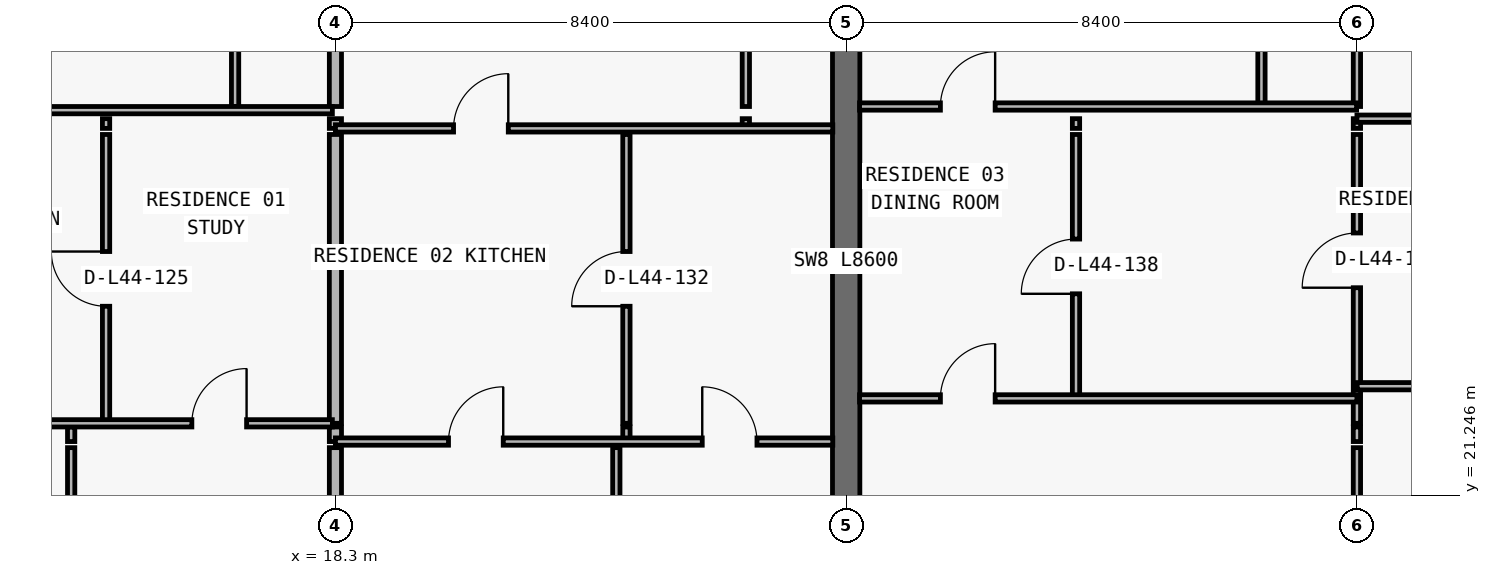
"""IFC4 building model, lengths in metres.
Left out: names, types, materials, properties, quantities, classifications, styles, units other than length and angle.
Written with IfcOpenShell. Run it as: python <this file> out.ifc"""

import sys

from ifc_helpers import new_model, si_unit, direction, frame, frame_2d, origin, place, context, subcontext, project, spatial, rectangle, extrude, element, fill, save


model = new_model("IFC4")
c1 = context("Model", 3, precision=1e-05, world=origin(), true_north=direction((0.0, 1.0)))
c2 = subcontext(c1, "Body", "Model", "MODEL_VIEW")
j1 = project(units=[si_unit("LENGTHUNIT", "METRE"), si_unit("PLANEANGLEUNIT", "RADIAN")], contexts=[c1])
p1 = place(None, origin())
s1 = spatial("IfcSite", under=j1, at=p1, CompositionType="ELEMENT")
p2 = place(p1, origin())
s2 = spatial("IfcBuilding", under=s1, at=p2, CompositionType="ELEMENT")
p3 = place(p2, frame((0.0, 0.0, 160.5)))
s3 = spatial("IfcBuildingStorey", under=s2, at=p3, CompositionType="ELEMENT", Elevation=160.5)
p4 = place(p3, frame((26.7, 20.8, 0.0), z_axis=(0.0, 0.0, 1.0), x_axis=(0.0, 1.0, 0.0)))
e1 = element("IfcWall", 1, at=p4, inside=s3, PredefinedType="SHEAR", context=c2, shape_type="SweptSolid", body=[
    extrude(rectangle(XDim=8.6, YDim=0.45, at=frame_2d((4.3, 0.0))), origin(), (0.0, 0.0, 1.0), 3.05),
])
p5 = place(p3, frame((13.954, 11.24, 0.0), z_axis=(0.0, 0.0, 1.0), x_axis=(0.0, 1.0, 0.0)))
e2 = element("IfcWall", 2, at=p5, inside=s3, PredefinedType="PARTITIONING", context=c2, shape_type="SweptSolid", body=[
    extrude(rectangle(XDim=10.79, YDim=0.12, at=frame_2d((5.395, 0.0))), origin(), (0.0, 0.0, 1.0), 3.05),
])
p6 = place(p3, frame((13.954, 22.13, 0.0), z_axis=(0.0, 0.0, 1.0), x_axis=(0.0, 1.0, 0.0)))
e3 = element("IfcWall", 3, at=p6, inside=s3, PredefinedType="PARTITIONING", context=c2, shape_type="SweptSolid", body=[
    extrude(rectangle(XDim=0.24, YDim=0.12, at=frame_2d((0.12, 0.0))), origin(), (0.0, 0.0, 1.0), 3.05),
])
p7 = place(p3, frame((14.528, 22.43, 0.0), z_axis=(0.0, 0.0, 1.0), x_axis=(0.0, 1.0, 0.0)))
e4 = element("IfcWall", 4, at=p7, inside=s3, PredefinedType="PARTITIONING", context=c2, shape_type="SweptSolid", body=[
    extrude(rectangle(XDim=4.75, YDim=0.12, at=frame_2d((2.375, 0.0))), origin(), (0.0, 0.0, 1.0), 3.05),
])
p8 = place(p7, frame((1.925, 0.0, 0.0)))
e5 = element("IfcOpeningElement", 5, at=p8, cuts=e4, PredefinedType="OPENING", context=c2, shape_type="SweptSolid", body=[
    extrude(rectangle(XDim=0.9, YDim=2.15, at=frame_2d((0.45, 1.075))), frame((0.0, 0.07, 0.0), z_axis=(0.0, -1.0, 0.0), x_axis=(1.0, 0.0, 0.0)), (0.0, 0.0, 1.0), 0.14),
])
p9 = place(p3, frame((14.528, 27.28, 0.0), z_axis=(0.0, 0.0, 1.0), x_axis=(0.0, 1.0, 0.0)))
e6 = element("IfcWall", 6, at=p9, inside=s3, PredefinedType="PARTITIONING", context=c2, shape_type="SweptSolid", body=[
    extrude(rectangle(XDim=0.16, YDim=0.12, at=frame_2d((0.08, 0.0))), origin(), (0.0, 0.0, 1.0), 3.05),
])
p10 = place(p3, frame((16.65, 27.64, 0.0), z_axis=(0.0, 0.0, 1.0), x_axis=(0.0, 1.0, 0.0)))
e7 = element("IfcWall", 7, at=p10, inside=s3, PredefinedType="PARTITIONING", context=c2, shape_type="SweptSolid", body=[
    extrude(rectangle(XDim=6.56, YDim=0.12, at=frame_2d((3.28, 0.0))), origin(), (0.0, 0.0, 1.0), 3.05),
])
p11 = place(p10, frame((2.855, 0.0, 0.0)))
e8 = element("IfcOpeningElement", 8, at=p11, cuts=e7, PredefinedType="OPENING", context=c2, shape_type="SweptSolid", body=[
    extrude(rectangle(XDim=0.85, YDim=2.1, at=frame_2d((0.425, 1.05))), frame((0.0, 0.07, 0.0), z_axis=(0.0, -1.0, 0.0), x_axis=(1.0, 0.0, 0.0)), (0.0, 0.0, 1.0), 0.14),
])
p12 = place(p3, frame((18.3, 11.24, 0.0), z_axis=(0.0, 0.0, 1.0), x_axis=(0.0, 1.0, 0.0)))
e9 = element("IfcWall", 9, at=p12, inside=s3, PredefinedType="PARTITIONING", context=c2, shape_type="SweptSolid", body=[
    extrude(rectangle(XDim=10.79, YDim=0.2, at=frame_2d((5.395, 0.0))), origin(), (0.0, 0.0, 1.0), 2.263),
])
p13 = place(p3, frame((18.3, 22.13, 0.0), z_axis=(0.0, 0.0, 1.0), x_axis=(0.0, 1.0, 0.0)))
e10 = element("IfcWall", 10, at=p13, inside=s3, PredefinedType="PARTITIONING", context=c2, shape_type="SweptSolid", body=[
    extrude(rectangle(XDim=0.24, YDim=0.2, at=frame_2d((0.12, 0.0))), origin(), (0.0, 0.0, 1.0), 2.263),
])
p14 = place(p3, frame((18.3, 22.43, 0.0), z_axis=(0.0, 0.0, 1.0), x_axis=(0.0, 1.0, 0.0)))
e11 = element("IfcWall", 11, at=p14, inside=s3, PredefinedType="PARTITIONING", context=c2, shape_type="SweptSolid", body=[
    extrude(rectangle(XDim=4.75, YDim=0.2, at=frame_2d((2.375, 0.0))), origin(), (0.0, 0.0, 1.0), 2.263),
])
p15 = place(p3, frame((18.3, 27.28, 0.0), z_axis=(0.0, 0.0, 1.0), x_axis=(0.0, 1.0, 0.0)))
e12 = element("IfcWall", 12, at=p15, inside=s3, PredefinedType="PARTITIONING", context=c2, shape_type="SweptSolid", body=[
    extrude(rectangle(XDim=0.16, YDim=0.2, at=frame_2d((0.08, 0.0))), origin(), (0.0, 0.0, 1.0), 2.263),
])
p16 = place(p3, frame((18.3, 27.64, 0.0), z_axis=(0.0, 0.0, 1.0), x_axis=(0.0, 1.0, 0.0)))
e13 = element("IfcWall", 13, at=p16, inside=s3, PredefinedType="PARTITIONING", context=c2, shape_type="SweptSolid", body=[
    extrude(rectangle(XDim=6.56, YDim=0.2, at=frame_2d((3.28, 0.0))), origin(), (0.0, 0.0, 1.0), 2.263),
])
p17 = place(p3, frame((22.92, 11.24, 0.0), z_axis=(0.0, 0.0, 1.0), x_axis=(0.0, 1.0, 0.0)))
e14 = element("IfcWall", 14, at=p17, inside=s3, PredefinedType="PARTITIONING", context=c2, shape_type="SweptSolid", body=[
    extrude(rectangle(XDim=10.79, YDim=0.12, at=frame_2d((5.395, 0.0))), origin(), (0.0, 0.0, 1.0), 3.05),
])
p18 = place(p3, frame((23.086, 22.13, 0.0), z_axis=(0.0, 0.0, 1.0), x_axis=(0.0, 1.0, 0.0)))
e15 = element("IfcWall", 15, at=p18, inside=s3, PredefinedType="PARTITIONING", context=c2, shape_type="SweptSolid", body=[
    extrude(rectangle(XDim=0.24, YDim=0.12, at=frame_2d((0.12, 0.0))), origin(), (0.0, 0.0, 1.0), 3.05),
])
p19 = place(p3, frame((23.086, 22.43, 0.0), z_axis=(0.0, 0.0, 1.0), x_axis=(0.0, 1.0, 0.0)))
e16 = element("IfcWall", 16, at=p19, inside=s3, PredefinedType="PARTITIONING", context=c2, shape_type="SweptSolid", body=[
    extrude(rectangle(XDim=4.75, YDim=0.12, at=frame_2d((2.375, 0.0))), origin(), (0.0, 0.0, 1.0), 3.05),
])
p20 = place(p19, frame((1.925, 0.0, 0.0)))
e17 = element("IfcOpeningElement", 17, at=p20, cuts=e16, PredefinedType="OPENING", context=c2, shape_type="SweptSolid", body=[
    extrude(rectangle(XDim=0.9, YDim=2.15, at=frame_2d((0.45, 1.075))), frame((0.0, 0.07, 0.0), z_axis=(0.0, -1.0, 0.0), x_axis=(1.0, 0.0, 0.0)), (0.0, 0.0, 1.0), 0.14),
])
p21 = place(p3, frame((25.05, 27.28, 0.0), z_axis=(0.0, 0.0, 1.0), x_axis=(0.0, 1.0, 0.0)))
e18 = element("IfcWall", 18, at=p21, inside=s3, PredefinedType="PARTITIONING", context=c2, shape_type="SweptSolid", body=[
    extrude(rectangle(XDim=0.16, YDim=0.12, at=frame_2d((0.08, 0.0))), origin(), (0.0, 0.0, 1.0), 3.05),
])
p22 = place(p3, frame((25.05, 27.64, 0.0), z_axis=(0.0, 0.0, 1.0), x_axis=(0.0, 1.0, 0.0)))
e19 = element("IfcWall", 19, at=p22, inside=s3, PredefinedType="PARTITIONING", context=c2, shape_type="SweptSolid", body=[
    extrude(rectangle(XDim=6.56, YDim=0.12, at=frame_2d((3.28, 0.0))), origin(), (0.0, 0.0, 1.0), 3.05),
])
p23 = place(p22, frame((2.855, 0.0, 0.0)))
e20 = element("IfcOpeningElement", 20, at=p23, cuts=e19, PredefinedType="OPENING", context=c2, shape_type="SweptSolid", body=[
    extrude(rectangle(XDim=0.85, YDim=2.1, at=frame_2d((0.425, 1.05))), frame((0.0, 0.07, 0.0), z_axis=(0.0, -1.0, 0.0), x_axis=(1.0, 0.0, 0.0)), (0.0, 0.0, 1.0), 0.14),
])
p24 = place(p3, frame((30.48, 22.84, 0.0), z_axis=(0.0, 0.0, 1.0), x_axis=(0.0, 1.0, 0.0)))
e21 = element("IfcWall", 21, at=p24, inside=s3, PredefinedType="PARTITIONING", context=c2, shape_type="SweptSolid", body=[
    extrude(rectangle(XDim=4.34, YDim=0.12, at=frame_2d((2.17, 0.0))), origin(), (0.0, 0.0, 1.0), 3.05),
])
p25 = place(p24, frame((1.72, 0.0, 0.0)))
e22 = element("IfcOpeningElement", 22, at=p25, cuts=e21, PredefinedType="OPENING", context=c2, shape_type="SweptSolid", body=[
    extrude(rectangle(XDim=0.9, YDim=2.15, at=frame_2d((0.45, 1.075))), frame((0.0, 0.07, 0.0), z_axis=(0.0, -1.0, 0.0), x_axis=(1.0, 0.0, 0.0)), (0.0, 0.0, 1.0), 0.14),
])
p26 = place(p3, frame((30.48, 27.28, 0.0), z_axis=(0.0, 0.0, 1.0), x_axis=(0.0, 1.0, 0.0)))
e23 = element("IfcWall", 23, at=p26, inside=s3, PredefinedType="PARTITIONING", context=c2, shape_type="SweptSolid", body=[
    extrude(rectangle(XDim=0.16, YDim=0.12, at=frame_2d((0.08, 0.0))), origin(), (0.0, 0.0, 1.0), 3.05),
])
p27 = place(p3, frame((33.53, 27.64, 0.0), z_axis=(0.0, 0.0, 1.0), x_axis=(0.0, 1.0, 0.0)))
e24 = element("IfcWall", 24, at=p27, inside=s3, PredefinedType="PARTITIONING", context=c2, shape_type="SweptSolid", body=[
    extrude(rectangle(XDim=6.56, YDim=0.12, at=frame_2d((3.28, 0.0))), origin(), (0.0, 0.0, 1.0), 3.05),
])
p28 = place(p27, frame((2.855, 0.0, 0.0)))
e25 = element("IfcOpeningElement", 25, at=p28, cuts=e24, PredefinedType="OPENING", context=c2, shape_type="SweptSolid", body=[
    extrude(rectangle(XDim=0.85, YDim=2.1, at=frame_2d((0.425, 1.05))), frame((0.0, 0.07, 0.0), z_axis=(0.0, -1.0, 0.0), x_axis=(1.0, 0.0, 0.0)), (0.0, 0.0, 1.0), 0.14),
])
p29 = place(p3, frame((35.1, 11.24, 0.0), z_axis=(0.0, 0.0, 1.0), x_axis=(0.0, 1.0, 0.0)))
e26 = element("IfcWall", 26, at=p29, inside=s3, PredefinedType="PARTITIONING", context=c2, shape_type="SweptSolid", body=[
    extrude(rectangle(XDim=10.79, YDim=0.12, at=frame_2d((5.395, 0.0))), origin(), (0.0, 0.0, 1.0), 2.263),
])
p30 = place(p3, frame((35.1, 22.13, 0.0), z_axis=(0.0, 0.0, 1.0), x_axis=(0.0, 1.0, 0.0)))
e27 = element("IfcWall", 27, at=p30, inside=s3, PredefinedType="PARTITIONING", context=c2, shape_type="SweptSolid", body=[
    extrude(rectangle(XDim=0.24, YDim=0.12, at=frame_2d((0.12, 0.0))), origin(), (0.0, 0.0, 1.0), 2.263),
])
p31 = place(p3, frame((35.1, 22.43, 0.0), z_axis=(0.0, 0.0, 1.0), x_axis=(0.0, 1.0, 0.0)))
e28 = element("IfcWall", 28, at=p31, inside=s3, PredefinedType="PARTITIONING", context=c2, shape_type="SweptSolid", body=[
    extrude(rectangle(XDim=4.75, YDim=0.12, at=frame_2d((2.375, 0.0))), origin(), (0.0, 0.0, 1.0), 2.263),
])
p32 = place(p31, frame((2.23, 0.0, 0.0)))
e29 = element("IfcOpeningElement", 29, at=p32, cuts=e28, PredefinedType="OPENING", context=c2, shape_type="SweptSolid", body=[
    extrude(rectangle(XDim=0.9, YDim=2.15, at=frame_2d((0.45, 1.075))), frame((0.0, 0.07, 0.0), z_axis=(0.0, -1.0, 0.0), x_axis=(1.0, 0.0, 0.0)), (0.0, 0.0, 1.0), 0.14),
])
p33 = place(p3, frame((35.1, 27.28, 0.0), z_axis=(0.0, 0.0, 1.0), x_axis=(0.0, 1.0, 0.0)))
e30 = element("IfcWall", 30, at=p33, inside=s3, PredefinedType="PARTITIONING", context=c2, shape_type="SweptSolid", body=[
    extrude(rectangle(XDim=0.16, YDim=0.12, at=frame_2d((0.08, 0.0))), origin(), (0.0, 0.0, 1.0), 2.263),
])
p34 = place(p3, frame((35.1, 27.64, 0.0), z_axis=(0.0, 0.0, 1.0), x_axis=(0.0, 1.0, 0.0)))
e31 = element("IfcWall", 31, at=p34, inside=s3, PredefinedType="PARTITIONING", context=c2, shape_type="SweptSolid", body=[
    extrude(rectangle(XDim=6.56, YDim=0.12, at=frame_2d((3.28, 0.0))), origin(), (0.0, 0.0, 1.0), 2.263),
])
p35 = place(p3, frame((18.3, 22.13, 0.0), z_axis=(0.0, 0.0, 1.0), x_axis=(1.0, 0.0, 0.0)))
e32 = element("IfcWall", 32, at=p35, inside=s3, PredefinedType="PARTITIONING", context=c2, shape_type="SweptSolid", body=[
    extrude(rectangle(XDim=8.18, YDim=0.12, at=frame_2d((4.09, 0.0))), origin(), (0.0, 0.0, 1.0), 3.05),
])
p36 = place(p35, frame((1.86, 0.0, 0.0)))
e33 = element("IfcOpeningElement", 33, at=p36, cuts=e32, PredefinedType="OPENING", context=c2, shape_type="SweptSolid", body=[
    extrude(rectangle(XDim=0.9, YDim=2.15, at=frame_2d((0.45, 1.075))), frame((0.0, 0.07, 0.0), z_axis=(0.0, -1.0, 0.0), x_axis=(1.0, 0.0, 0.0)), (0.0, 0.0, 1.0), 0.14),
])
p37 = place(p35, frame((6.033, 0.0, 0.0)))
e34 = element("IfcOpeningElement", 34, at=p37, cuts=e32, PredefinedType="OPENING", context=c2, shape_type="SweptSolid", body=[
    extrude(rectangle(XDim=0.9, YDim=2.15, at=frame_2d((0.45, 1.075))), frame((0.0, 0.07, 0.0), z_axis=(0.0, -1.0, 0.0), x_axis=(1.0, 0.0, 0.0)), (0.0, 0.0, 1.0), 0.14),
])
p38 = place(p3, frame((10.1, 22.43, 0.0), z_axis=(0.0, 0.0, 1.0), x_axis=(1.0, 0.0, 0.0)))
e35 = element("IfcWall", 35, at=p38, inside=s3, PredefinedType="PARTITIONING", context=c2, shape_type="SweptSolid", body=[
    extrude(rectangle(XDim=8.15, YDim=0.12, at=frame_2d((4.075, 0.0))), origin(), (0.0, 0.0, 1.0), 3.05),
])
p39 = place(p38, frame((1.477, 0.0, 0.0)))
e36 = element("IfcOpeningElement", 36, at=p39, cuts=e35, PredefinedType="OPENING", context=c2, shape_type="SweptSolid", body=[
    extrude(rectangle(XDim=0.9, YDim=2.15, at=frame_2d((0.45, 1.075))), frame((0.0, 0.07, 0.0), z_axis=(0.0, -1.0, 0.0), x_axis=(1.0, 0.0, 0.0)), (0.0, 0.0, 1.0), 0.14),
])
p40 = place(p38, frame((5.839, 0.0, 0.0)))
e37 = element("IfcOpeningElement", 37, at=p40, cuts=e35, PredefinedType="OPENING", context=c2, shape_type="SweptSolid", body=[
    extrude(rectangle(XDim=0.9, YDim=2.15, at=frame_2d((0.45, 1.075))), frame((0.0, 0.07, 0.0), z_axis=(0.0, -1.0, 0.0), x_axis=(1.0, 0.0, 0.0)), (0.0, 0.0, 1.0), 0.14),
])
p41 = place(p3, frame((26.92, 22.84, 0.0), z_axis=(0.0, 0.0, 1.0), x_axis=(1.0, 0.0, 0.0)))
e38 = element("IfcWall", 38, at=p41, inside=s3, PredefinedType="PARTITIONING", context=c2, shape_type="SweptSolid", body=[
    extrude(rectangle(XDim=8.18, YDim=0.12, at=frame_2d((4.09, 0.0))), origin(), (0.0, 0.0, 1.0), 3.05),
])
p42 = place(p41, frame((1.33, 0.0, 0.0)))
e39 = element("IfcOpeningElement", 39, at=p42, cuts=e38, PredefinedType="OPENING", context=c2, shape_type="SweptSolid", body=[
    extrude(rectangle(XDim=0.9, YDim=2.15, at=frame_2d((0.45, 1.075))), frame((0.0, 0.07, 0.0), z_axis=(0.0, -1.0, 0.0), x_axis=(1.0, 0.0, 0.0)), (0.0, 0.0, 1.0), 0.14),
])
p43 = place(p3, frame((35.105, 23.04, 0.0), z_axis=(0.0, 0.0, 1.0), x_axis=(1.0, 0.0, 0.0)))
e40 = element("IfcWall", 40, at=p43, inside=s3, PredefinedType="PARTITIONING", context=c2, shape_type="SweptSolid", body=[
    extrude(rectangle(XDim=7.595, YDim=0.12, at=frame_2d((3.797, 0.0))), origin(), (0.0, 0.0, 1.0), 3.05),
])
p44 = place(p43, frame((3.347, 0.0, 0.0)))
e41 = element("IfcOpeningElement", 41, at=p44, cuts=e40, PredefinedType="OPENING", context=c2, shape_type="SweptSolid", body=[
    extrude(rectangle(XDim=0.9, YDim=2.15, at=frame_2d((0.45, 1.075))), frame((0.0, 0.07, 0.0), z_axis=(0.0, -1.0, 0.0), x_axis=(1.0, 0.0, 0.0)), (0.0, 0.0, 1.0), 0.14),
])
p45 = place(p3, frame((18.3, 27.28, 0.0), z_axis=(0.0, 0.0, 1.0), x_axis=(1.0, 0.0, 0.0)))
e42 = element("IfcWall", 42, at=p45, inside=s3, PredefinedType="PARTITIONING", context=c2, shape_type="SweptSolid", body=[
    extrude(rectangle(XDim=8.18, YDim=0.12, at=frame_2d((4.09, 0.0))), origin(), (0.0, 0.0, 1.0), 3.05),
])
p46 = place(p45, frame((1.943, 0.0, 0.0)))
e43 = element("IfcOpeningElement", 43, at=p46, cuts=e42, PredefinedType="OPENING", context=c2, shape_type="SweptSolid", body=[
    extrude(rectangle(XDim=0.9, YDim=2.15, at=frame_2d((0.45, 1.075))), frame((0.0, 0.07, 0.0), z_axis=(0.0, -1.0, 0.0), x_axis=(1.0, 0.0, 0.0)), (0.0, 0.0, 1.0), 0.14),
])
p47 = place(p3, frame((35.1, 27.44, 0.0), z_axis=(0.0, 0.0, 1.0), x_axis=(1.0, 0.0, 0.0)))
e44 = element("IfcWall", 44, at=p47, inside=s3, PredefinedType="PARTITIONING", context=c2, shape_type="SweptSolid", body=[
    extrude(rectangle(XDim=7.6, YDim=0.12, at=frame_2d((3.8, 0.0))), origin(), (0.0, 0.0, 1.0), 3.05),
])
p48 = place(p47, frame((2.6, 0.0, 0.0)))
e45 = element("IfcOpeningElement", 45, at=p48, cuts=e44, PredefinedType="OPENING", context=c2, shape_type="SweptSolid", body=[
    extrude(rectangle(XDim=0.9, YDim=2.15, at=frame_2d((0.45, 1.075))), frame((0.0, 0.07, 0.0), z_axis=(0.0, -1.0, 0.0), x_axis=(1.0, 0.0, 0.0)), (0.0, 0.0, 1.0), 0.14),
])
p49 = place(p3, frame((10.1, 27.58, 0.0), z_axis=(0.0, 0.0, 1.0), x_axis=(1.0, 0.0, 0.0)))
e46 = element("IfcWall", 46, at=p49, inside=s3, PredefinedType="PARTITIONING", context=c2, shape_type="SweptSolid", body=[
    extrude(rectangle(XDim=8.15, YDim=0.12, at=frame_2d((4.075, 0.0))), origin(), (0.0, 0.0, 1.0), 3.05),
])
p50 = place(p49, frame((1.764, 0.0, 0.0)))
e47 = element("IfcOpeningElement", 47, at=p50, cuts=e46, PredefinedType="OPENING", context=c2, shape_type="SweptSolid", body=[
    extrude(rectangle(XDim=0.9, YDim=2.15, at=frame_2d((0.45, 1.075))), frame((0.0, 0.07, 0.0), z_axis=(0.0, -1.0, 0.0), x_axis=(1.0, 0.0, 0.0)), (0.0, 0.0, 1.0), 0.14),
])
p51 = place(p3, frame((26.92, 27.64, 0.0), z_axis=(0.0, 0.0, 1.0), x_axis=(1.0, 0.0, 0.0)))
e48 = element("IfcWall", 48, at=p51, inside=s3, PredefinedType="PARTITIONING", context=c2, shape_type="SweptSolid", body=[
    extrude(rectangle(XDim=8.175, YDim=0.12, at=frame_2d((4.087, 0.0))), origin(), (0.0, 0.0, 1.0), 3.05),
])
p52 = place(p51, frame((1.33, 0.0, 0.0)))
e49 = element("IfcOpeningElement", 49, at=p52, cuts=e48, PredefinedType="OPENING", context=c2, shape_type="SweptSolid", body=[
    extrude(rectangle(XDim=0.9, YDim=2.15, at=frame_2d((0.45, 1.075))), frame((0.0, 0.07, 0.0), z_axis=(0.0, -1.0, 0.0), x_axis=(1.0, 0.0, 0.0)), (0.0, 0.0, 1.0), 0.14),
])
p53 = place(p8, origin())
e50 = element("IfcDoor", 50, at=p53, inside=s3, OperationType="SINGLE_SWING_RIGHT", PredefinedType="DOOR", context=c2, shape_type="SweptSolid", body=[
    extrude(rectangle(XDim=0.9, YDim=2.15, at=frame_2d((0.45, 1.075))), frame((0.0, 0.025, 0.0), z_axis=(0.0, -1.0, 0.0), x_axis=(1.0, 0.0, 0.0)), (0.0, 0.0, 1.0), 0.05),
])
fill(e5, e50)
p54 = place(p40, origin())
e51 = element("IfcDoor", 51, at=p54, inside=s3, OperationType="SINGLE_SWING_RIGHT", PredefinedType="DOOR", context=c2, shape_type="SweptSolid", body=[
    extrude(rectangle(XDim=0.9, YDim=2.15, at=frame_2d((0.45, 1.075))), frame((0.0, 0.025, 0.0), z_axis=(0.0, -1.0, 0.0), x_axis=(1.0, 0.0, 0.0)), (0.0, 0.0, 1.0), 0.05),
])
fill(e37, e51)
p55 = place(p46, origin())
e52 = element("IfcDoor", 52, at=p55, inside=s3, OperationType="SINGLE_SWING_RIGHT", PredefinedType="DOOR", context=c2, shape_type="SweptSolid", body=[
    extrude(rectangle(XDim=0.9, YDim=2.15, at=frame_2d((0.45, 1.075))), frame((0.0, 0.025, 0.0), z_axis=(0.0, -1.0, 0.0), x_axis=(1.0, 0.0, 0.0)), (0.0, 0.0, 1.0), 0.05),
])
fill(e43, e52)
p56 = place(p20, origin())
e53 = element("IfcDoor", 53, at=p56, inside=s3, OperationType="SINGLE_SWING_LEFT", PredefinedType="DOOR", context=c2, shape_type="SweptSolid", body=[
    extrude(rectangle(XDim=0.9, YDim=2.15, at=frame_2d((0.45, 1.075))), frame((0.0, 0.025, 0.0), z_axis=(0.0, -1.0, 0.0), x_axis=(1.0, 0.0, 0.0)), (0.0, 0.0, 1.0), 0.05),
])
fill(e17, e53)
p57 = place(p36, origin())
e54 = element("IfcDoor", 54, at=p57, inside=s3, OperationType="SINGLE_SWING_RIGHT", PredefinedType="DOOR", context=c2, shape_type="SweptSolid", body=[
    extrude(rectangle(XDim=0.9, YDim=2.15, at=frame_2d((0.45, 1.075))), frame((0.0, 0.025, 0.0), z_axis=(0.0, -1.0, 0.0), x_axis=(1.0, 0.0, 0.0)), (0.0, 0.0, 1.0), 0.05),
])
fill(e33, e54)
p58 = place(p37, origin())
e55 = element("IfcDoor", 55, at=p58, inside=s3, OperationType="SINGLE_SWING_LEFT", PredefinedType="DOOR", context=c2, shape_type="SweptSolid", body=[
    extrude(rectangle(XDim=0.9, YDim=2.15, at=frame_2d((0.45, 1.075))), frame((0.0, 0.025, 0.0), z_axis=(0.0, -1.0, 0.0), x_axis=(1.0, 0.0, 0.0)), (0.0, 0.0, 1.0), 0.05),
])
fill(e34, e55)
p59 = place(p52, origin())
e56 = element("IfcDoor", 56, at=p59, inside=s3, OperationType="SINGLE_SWING_RIGHT", PredefinedType="DOOR", context=c2, shape_type="SweptSolid", body=[
    extrude(rectangle(XDim=0.9, YDim=2.15, at=frame_2d((0.45, 1.075))), frame((0.0, 0.025, 0.0), z_axis=(0.0, -1.0, 0.0), x_axis=(1.0, 0.0, 0.0)), (0.0, 0.0, 1.0), 0.05),
])
fill(e49, e56)
p60 = place(p25, origin())
e57 = element("IfcDoor", 57, at=p60, inside=s3, OperationType="SINGLE_SWING_LEFT", PredefinedType="DOOR", context=c2, shape_type="SweptSolid", body=[
    extrude(rectangle(XDim=0.9, YDim=2.15, at=frame_2d((0.45, 1.075))), frame((0.0, 0.025, 0.0), z_axis=(0.0, -1.0, 0.0), x_axis=(1.0, 0.0, 0.0)), (0.0, 0.0, 1.0), 0.05),
])
fill(e22, e57)
p61 = place(p42, origin())
e58 = element("IfcDoor", 58, at=p61, inside=s3, OperationType="SINGLE_SWING_RIGHT", PredefinedType="DOOR", context=c2, shape_type="SweptSolid", body=[
    extrude(rectangle(XDim=0.9, YDim=2.15, at=frame_2d((0.45, 1.075))), frame((0.0, 0.025, 0.0), z_axis=(0.0, -1.0, 0.0), x_axis=(1.0, 0.0, 0.0)), (0.0, 0.0, 1.0), 0.05),
])
fill(e39, e58)
p62 = place(p32, origin())
e59 = element("IfcDoor", 59, at=p62, inside=s3, OperationType="SINGLE_SWING_LEFT", PredefinedType="DOOR", context=c2, shape_type="SweptSolid", body=[
    extrude(rectangle(XDim=0.9, YDim=2.15, at=frame_2d((0.45, 1.075))), frame((0.0, 0.025, 0.0), z_axis=(0.0, -1.0, 0.0), x_axis=(1.0, 0.0, 0.0)), (0.0, 0.0, 1.0), 0.05),
])
fill(e29, e59)
save(model, sys.argv[1])
